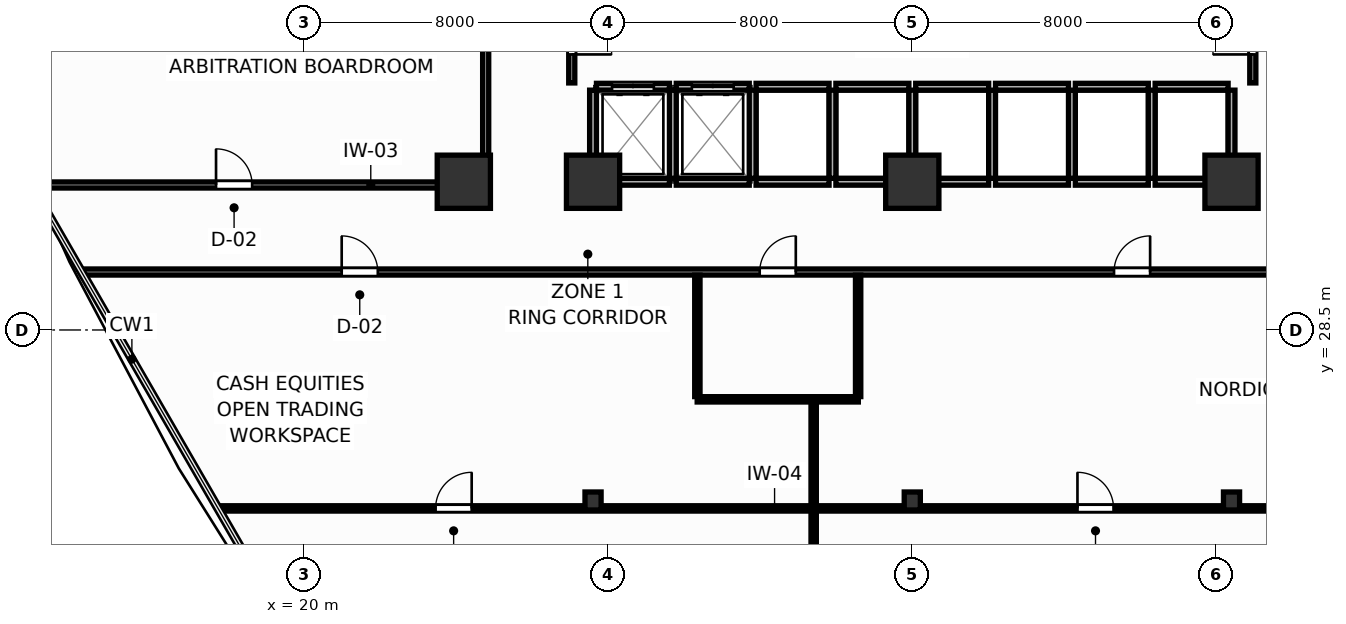
"""IFC4 building model, lengths in metres.
Left out: names, types, materials, properties, quantities, classifications, styles, units other than length and angle.
Written with IfcOpenShell. Run it as: python <this file> out.ifc"""

import sys

from ifc_helpers import new_model, si_unit, direction, frame, frame_2d, origin, origin_2d, place, context, subcontext, project, spatial, rectangle, i_section, extrude, source, transform, mapped, element, fill, save


model = new_model("IFC4")
c1 = context("Model", 3, precision=1e-05, world=origin(), true_north=direction((0.0, 1.0)))
c2 = subcontext(c1, "Body", "Model", "MODEL_VIEW")
j1 = project(units=[si_unit("LENGTHUNIT", "METRE"), si_unit("PLANEANGLEUNIT", "RADIAN")], contexts=[c1])
p1 = place(None, origin())
s1 = spatial("IfcSite", under=j1, at=p1, CompositionType="ELEMENT")
p2 = place(p1, origin())
s2 = spatial("IfcBuilding", under=s1, at=p2, CompositionType="ELEMENT")
p3 = place(p2, frame((0.0, 0.0, 27.9)))
s3 = spatial("IfcBuildingStorey", under=s2, at=p3, CompositionType="ELEMENT", Elevation=27.9)
m1 = source(origin(), c2, "Body", "SweptSolid", [
    extrude(rectangle(XDim=1.4, YDim=1.4, at=origin_2d()), origin(), (0.0, 0.0, 1.0), 3.9),
])
for number, where, z_axis, x_axis in (
    (1, (27.6, 32.4, 0.0), (0.0, 0.0, 1.0), (1.0, 0.0, 0.0)),
    (2, (44.4, 32.4, 0.0), (0.0, 0.0, 1.0), (1.0, 0.0, 0.0)),
    (3, (36.0, 32.4, 0.0), (0.0, 0.0, 1.0), (1.0, 0.0, 0.0)),
    (4, (24.2, 32.4, 0.0), (0.0, 0.0, 1.0), (1.0, 0.0, 0.0)),
):
    element("IfcColumn", number, at=place(p3, frame(where, z_axis=z_axis, x_axis=x_axis)), inside=s3, PredefinedType="COLUMN", context=c2, shape_type="MappedRepresentation", body=[
        mapped(m1, transform((0.0, 0.0, 0.0), scale=1.0)),
    ])
m2 = source(origin(), c2, "Body", "SweptSolid", [
    extrude(i_section(OverallWidth=0.424, OverallDepth=0.474, WebThickness=0.045, FlangeThickness=0.072, FilletRadius=0.015, at=origin_2d()), origin(), (0.0, 0.0, 1.0), 3.9),
])
for number, where, z_axis, x_axis in (
    (5, (27.6, 24.0, 0.0), (0.0, 0.0, 1.0), (1.0, 0.0, 0.0)),
    (6, (44.4, 24.0, 0.0), (0.0, 0.0, 1.0), (1.0, 0.0, 0.0)),
    (7, (36.0, 24.0, 0.0), (0.0, 0.0, 1.0), (1.0, 0.0, 0.0)),
):
    element("IfcColumn", number, at=place(p3, frame(where, z_axis=z_axis, x_axis=x_axis)), inside=s3, PredefinedType="COLUMN", context=c2, shape_type="MappedRepresentation", body=[
        mapped(m2, transform((0.0, 0.0, 0.0), scale=1.0)),
    ])
p4 = place(p3, frame((27.69, 34.9, 0.0), z_axis=(0.0, 0.0, 1.0), x_axis=(1.0, 0.0, 0.0)))
e8 = element("IfcWall", 8, at=p4, inside=s3, PredefinedType="PARTITIONING", context=c2, shape_type="SweptSolid", body=[
    extrude(rectangle(XDim=1.92, YDim=0.18, at=frame_2d((0.96, 0.0))), origin(), (0.0, 0.0, 1.0), 3.68),
])
p5 = place(p4, frame((0.41, 0.0, 0.0)))
e9 = element("IfcOpeningElement", 9, at=p5, cuts=e8, PredefinedType="OPENING", context=c2, shape_type="SweptSolid", body=[
    extrude(rectangle(XDim=1.1, YDim=2.1, at=frame_2d((0.55, 1.05))), frame((0.0, 0.1, 0.0), z_axis=(0.0, -1.0, 0.0), x_axis=(1.0, 0.0, 0.0)), (0.0, 0.0, 1.0), 0.2),
])
p6 = place(p3, frame((27.69, 32.4, 0.0), z_axis=(0.0, 0.0, 1.0), x_axis=(1.0, 0.0, 0.0)))
e10 = element("IfcWall", 10, at=p6, inside=s3, PredefinedType="PARTITIONING", context=c2, shape_type="SweptSolid", body=[
    extrude(rectangle(XDim=1.92, YDim=0.18, at=frame_2d((0.96, 0.0))), origin(), (0.0, 0.0, 1.0), 3.18),
])
p7 = place(p3, frame((27.6, 32.49, 0.0), z_axis=(0.0, 0.0, 1.0), x_axis=(0.0, 1.0, 0.0)))
e11 = element("IfcWall", 11, at=p7, inside=s3, PredefinedType="PARTITIONING", context=c2, shape_type="SweptSolid", body=[
    extrude(rectangle(XDim=2.32, YDim=0.18, at=frame_2d((1.16, 0.0))), origin(), (0.0, 0.0, 1.0), 3.68),
])
p8 = place(p3, frame((29.79, 34.9, 0.0), z_axis=(0.0, 0.0, 1.0), x_axis=(1.0, 0.0, 0.0)))
e12 = element("IfcWall", 12, at=p8, inside=s3, PredefinedType="PARTITIONING", context=c2, shape_type="SweptSolid", body=[
    extrude(rectangle(XDim=1.92, YDim=0.18, at=frame_2d((0.96, 0.0))), origin(), (0.0, 0.0, 1.0), 3.68),
])
p9 = place(p8, frame((0.41, 0.0, 0.0)))
e13 = element("IfcOpeningElement", 13, at=p9, cuts=e12, PredefinedType="OPENING", context=c2, shape_type="SweptSolid", body=[
    extrude(rectangle(XDim=1.1, YDim=2.1, at=frame_2d((0.55, 1.05))), frame((0.0, 0.1, 0.0), z_axis=(0.0, -1.0, 0.0), x_axis=(1.0, 0.0, 0.0)), (0.0, 0.0, 1.0), 0.2),
])
p10 = place(p3, frame((29.79, 32.4, 0.0), z_axis=(0.0, 0.0, 1.0), x_axis=(1.0, 0.0, 0.0)))
e14 = element("IfcWall", 14, at=p10, inside=s3, PredefinedType="PARTITIONING", context=c2, shape_type="SweptSolid", body=[
    extrude(rectangle(XDim=1.92, YDim=0.18, at=frame_2d((0.96, 0.0))), origin(), (0.0, 0.0, 1.0), 3.18),
])
p11 = place(p3, frame((29.7, 32.49, 0.0), z_axis=(0.0, 0.0, 1.0), x_axis=(0.0, 1.0, 0.0)))
e15 = element("IfcWall", 15, at=p11, inside=s3, PredefinedType="PARTITIONING", context=c2, shape_type="SweptSolid", body=[
    extrude(rectangle(XDim=2.32, YDim=0.18, at=frame_2d((1.16, 0.0))), origin(), (0.0, 0.0, 1.0), 3.68),
])
p12 = place(p3, frame((31.89, 34.9, 0.0), z_axis=(0.0, 0.0, 1.0), x_axis=(1.0, 0.0, 0.0)))
e16 = element("IfcWall", 16, at=p12, inside=s3, PredefinedType="PARTITIONING", context=c2, shape_type="SweptSolid", body=[
    extrude(rectangle(XDim=1.92, YDim=0.18, at=frame_2d((0.96, 0.0))), origin(), (0.0, 0.0, 1.0), 3.68),
])
p13 = place(p3, frame((31.89, 32.4, 0.0), z_axis=(0.0, 0.0, 1.0), x_axis=(1.0, 0.0, 0.0)))
e17 = element("IfcWall", 17, at=p13, inside=s3, PredefinedType="PARTITIONING", context=c2, shape_type="SweptSolid", body=[
    extrude(rectangle(XDim=1.92, YDim=0.18, at=frame_2d((0.96, 0.0))), origin(), (0.0, 0.0, 1.0), 3.18),
])
p14 = place(p3, frame((31.8, 32.49, 0.0), z_axis=(0.0, 0.0, 1.0), x_axis=(0.0, 1.0, 0.0)))
e18 = element("IfcWall", 18, at=p14, inside=s3, PredefinedType="PARTITIONING", context=c2, shape_type="SweptSolid", body=[
    extrude(rectangle(XDim=2.32, YDim=0.18, at=frame_2d((1.16, 0.0))), origin(), (0.0, 0.0, 1.0), 3.68),
])
p15 = place(p3, frame((33.99, 34.9, 0.0), z_axis=(0.0, 0.0, 1.0), x_axis=(1.0, 0.0, 0.0)))
e19 = element("IfcWall", 19, at=p15, inside=s3, PredefinedType="PARTITIONING", context=c2, shape_type="SweptSolid", body=[
    extrude(rectangle(XDim=1.92, YDim=0.18, at=frame_2d((0.96, 0.0))), origin(), (0.0, 0.0, 1.0), 3.68),
])
p16 = place(p3, frame((33.99, 32.4, 0.0), z_axis=(0.0, 0.0, 1.0), x_axis=(1.0, 0.0, 0.0)))
e20 = element("IfcWall", 20, at=p16, inside=s3, PredefinedType="PARTITIONING", context=c2, shape_type="SweptSolid", body=[
    extrude(rectangle(XDim=1.92, YDim=0.18, at=frame_2d((0.96, 0.0))), origin(), (0.0, 0.0, 1.0), 3.18),
])
p17 = place(p3, frame((33.9, 32.49, 0.0), z_axis=(0.0, 0.0, 1.0), x_axis=(0.0, 1.0, 0.0)))
e21 = element("IfcWall", 21, at=p17, inside=s3, PredefinedType="PARTITIONING", context=c2, shape_type="SweptSolid", body=[
    extrude(rectangle(XDim=2.32, YDim=0.18, at=frame_2d((1.16, 0.0))), origin(), (0.0, 0.0, 1.0), 3.68),
])
p18 = place(p3, frame((36.09, 34.9, 0.0), z_axis=(0.0, 0.0, 1.0), x_axis=(1.0, 0.0, 0.0)))
e22 = element("IfcWall", 22, at=p18, inside=s3, PredefinedType="PARTITIONING", context=c2, shape_type="SweptSolid", body=[
    extrude(rectangle(XDim=1.92, YDim=0.18, at=frame_2d((0.96, 0.0))), origin(), (0.0, 0.0, 1.0), 3.68),
])
p19 = place(p3, frame((36.09, 32.4, 0.0), z_axis=(0.0, 0.0, 1.0), x_axis=(1.0, 0.0, 0.0)))
e23 = element("IfcWall", 23, at=p19, inside=s3, PredefinedType="PARTITIONING", context=c2, shape_type="SweptSolid", body=[
    extrude(rectangle(XDim=1.92, YDim=0.18, at=frame_2d((0.96, 0.0))), origin(), (0.0, 0.0, 1.0), 3.18),
])
p20 = place(p3, frame((36.0, 32.49, 0.0), z_axis=(0.0, 0.0, 1.0), x_axis=(0.0, 1.0, 0.0)))
e24 = element("IfcWall", 24, at=p20, inside=s3, PredefinedType="PARTITIONING", context=c2, shape_type="SweptSolid", body=[
    extrude(rectangle(XDim=2.32, YDim=0.18, at=frame_2d((1.16, 0.0))), origin(), (0.0, 0.0, 1.0), 3.68),
])
p21 = place(p3, frame((38.19, 34.9, 0.0), z_axis=(0.0, 0.0, 1.0), x_axis=(1.0, 0.0, 0.0)))
e25 = element("IfcWall", 25, at=p21, inside=s3, PredefinedType="PARTITIONING", context=c2, shape_type="SweptSolid", body=[
    extrude(rectangle(XDim=1.92, YDim=0.18, at=frame_2d((0.96, 0.0))), origin(), (0.0, 0.0, 1.0), 3.68),
])
p22 = place(p3, frame((38.19, 32.4, 0.0), z_axis=(0.0, 0.0, 1.0), x_axis=(1.0, 0.0, 0.0)))
e26 = element("IfcWall", 26, at=p22, inside=s3, PredefinedType="PARTITIONING", context=c2, shape_type="SweptSolid", body=[
    extrude(rectangle(XDim=1.92, YDim=0.18, at=frame_2d((0.96, 0.0))), origin(), (0.0, 0.0, 1.0), 3.18),
])
p23 = place(p3, frame((38.1, 32.49, 0.0), z_axis=(0.0, 0.0, 1.0), x_axis=(0.0, 1.0, 0.0)))
e27 = element("IfcWall", 27, at=p23, inside=s3, PredefinedType="PARTITIONING", context=c2, shape_type="SweptSolid", body=[
    extrude(rectangle(XDim=2.32, YDim=0.18, at=frame_2d((1.16, 0.0))), origin(), (0.0, 0.0, 1.0), 3.68),
])
p24 = place(p3, frame((40.29, 34.9, 0.0), z_axis=(0.0, 0.0, 1.0), x_axis=(1.0, 0.0, 0.0)))
e28 = element("IfcWall", 28, at=p24, inside=s3, PredefinedType="PARTITIONING", context=c2, shape_type="SweptSolid", body=[
    extrude(rectangle(XDim=1.92, YDim=0.18, at=frame_2d((0.96, 0.0))), origin(), (0.0, 0.0, 1.0), 3.68),
])
p25 = place(p3, frame((40.29, 32.4, 0.0), z_axis=(0.0, 0.0, 1.0), x_axis=(1.0, 0.0, 0.0)))
e29 = element("IfcWall", 29, at=p25, inside=s3, PredefinedType="PARTITIONING", context=c2, shape_type="SweptSolid", body=[
    extrude(rectangle(XDim=1.92, YDim=0.18, at=frame_2d((0.96, 0.0))), origin(), (0.0, 0.0, 1.0), 3.18),
])
p26 = place(p3, frame((40.2, 32.49, 0.0), z_axis=(0.0, 0.0, 1.0), x_axis=(0.0, 1.0, 0.0)))
e30 = element("IfcWall", 30, at=p26, inside=s3, PredefinedType="PARTITIONING", context=c2, shape_type="SweptSolid", body=[
    extrude(rectangle(XDim=2.32, YDim=0.18, at=frame_2d((1.16, 0.0))), origin(), (0.0, 0.0, 1.0), 3.68),
])
p27 = place(p3, frame((42.39, 34.9, 0.0), z_axis=(0.0, 0.0, 1.0), x_axis=(1.0, 0.0, 0.0)))
e31 = element("IfcWall", 31, at=p27, inside=s3, PredefinedType="PARTITIONING", context=c2, shape_type="SweptSolid", body=[
    extrude(rectangle(XDim=1.92, YDim=0.18, at=frame_2d((0.96, 0.0))), origin(), (0.0, 0.0, 1.0), 3.68),
])
p28 = place(p3, frame((42.39, 32.4, 0.0), z_axis=(0.0, 0.0, 1.0), x_axis=(1.0, 0.0, 0.0)))
e32 = element("IfcWall", 32, at=p28, inside=s3, PredefinedType="PARTITIONING", context=c2, shape_type="SweptSolid", body=[
    extrude(rectangle(XDim=1.92, YDim=0.18, at=frame_2d((0.96, 0.0))), origin(), (0.0, 0.0, 1.0), 3.18),
])
for number, where, z_axis, x_axis in (
    (33, (42.3, 32.49, 0.0), (0.0, 0.0, 1.0), (0.0, 1.0, 0.0)),
    (34, (44.4, 32.49, 0.0), (0.0, 0.0, 1.0), (0.0, 1.0, 0.0)),
):
    element("IfcWall", number, at=place(p3, frame(where, z_axis=z_axis, x_axis=x_axis)), inside=s3, PredefinedType="PARTITIONING", context=c2, shape_type="SweptSolid", body=[
        extrude(rectangle(XDim=2.32, YDim=0.18, at=frame_2d((1.16, 0.0))), origin(), (0.0, 0.0, 1.0), 3.68),
    ])
p29 = place(p3, frame((27.04, 35.0, 0.0), z_axis=(0.0, 0.0, 1.0), x_axis=(0.0, 1.0, 0.0)))
e35 = element("IfcWall", 35, at=p29, inside=s3, PredefinedType="PARTITIONING", context=c2, shape_type="SweptSolid", body=[
    extrude(rectangle(XDim=2.65, YDim=0.16, at=frame_2d((1.325, 0.0))), origin(), (0.0, 0.0, 1.0), 3.68),
])
p30 = place(p29, frame((0.75, 0.0, 0.0)))
e36 = element("IfcOpeningElement", 36, at=p30, cuts=e35, PredefinedType="OPENING", context=c2, shape_type="SweptSolid", body=[
    extrude(rectangle(XDim=1.05, YDim=2.1, at=frame_2d((0.525, 1.05))), frame((0.0, 0.09, 0.0), z_axis=(0.0, -1.0, 0.0), x_axis=(1.0, 0.0, 0.0)), (0.0, 0.0, 1.0), 0.18),
])
p31 = place(p3, frame((44.96, 35.0, 0.0), z_axis=(0.0, 0.0, 1.0), x_axis=(0.0, 1.0, 0.0)))
e37 = element("IfcWall", 37, at=p31, inside=s3, PredefinedType="PARTITIONING", context=c2, shape_type="SweptSolid", body=[
    extrude(rectangle(XDim=2.65, YDim=0.16, at=frame_2d((1.325, 0.0))), origin(), (0.0, 0.0, 1.0), 3.68),
])
p32 = place(p31, frame((0.75, 0.0, 0.0)))
e38 = element("IfcOpeningElement", 38, at=p32, cuts=e37, PredefinedType="OPENING", context=c2, shape_type="SweptSolid", body=[
    extrude(rectangle(XDim=1.05, YDim=2.1, at=frame_2d((0.525, 1.05))), frame((0.0, 0.09, 0.0), z_axis=(0.0, -1.0, 0.0), x_axis=(1.0, 0.0, 0.0)), (0.0, 0.0, 1.0), 0.18),
])
p33 = place(p3, frame((14.162, 30.025, 0.0), z_axis=(0.0, 0.0, 1.0), x_axis=(1.0, 0.0, 0.0)))
e39 = element("IfcWall", 39, at=p33, inside=s3, PredefinedType="PARTITIONING", context=c2, shape_type="SweptSolid", body=[
    extrude(rectangle(XDim=43.676, YDim=0.16, at=frame_2d((21.838, 0.0))), origin(), (0.0, 0.0, 1.0), 3.68),
])
p34 = place(p33, frame((17.823, 0.0, 0.0)))
e40 = element("IfcOpeningElement", 40, at=p34, cuts=e39, PredefinedType="OPENING", context=c2, shape_type="SweptSolid", body=[
    extrude(rectangle(XDim=0.95, YDim=2.05, at=frame_2d((0.475, 1.025))), frame((0.0, 0.09, 0.0), z_axis=(0.0, -1.0, 0.0), x_axis=(1.0, 0.0, 0.0)), (0.0, 0.0, 1.0), 0.18),
])
p35 = place(p33, frame((6.824, 0.0, 0.0)))
e41 = element("IfcOpeningElement", 41, at=p35, cuts=e39, PredefinedType="OPENING", context=c2, shape_type="SweptSolid", body=[
    extrude(rectangle(XDim=0.95, YDim=2.05, at=frame_2d((0.475, 1.025))), frame((0.0, 0.09, 0.0), z_axis=(0.0, -1.0, 0.0), x_axis=(1.0, 0.0, 0.0)), (0.0, 0.0, 1.0), 0.18),
])
p36 = place(p33, frame((27.146, 0.0, 0.0)))
e42 = element("IfcOpeningElement", 42, at=p36, cuts=e39, PredefinedType="OPENING", context=c2, shape_type="SweptSolid", body=[
    extrude(rectangle(XDim=0.95, YDim=2.05, at=frame_2d((0.475, 1.025))), frame((0.0, 0.09, 0.0), z_axis=(0.0, -1.0, 0.0), x_axis=(1.0, 0.0, 0.0)), (0.0, 0.0, 1.0), 0.18),
])
p37 = place(p3, frame((24.775, 32.31, 0.0), z_axis=(0.0, 0.0, 1.0), x_axis=(0.0, 1.0, 0.0)))
e43 = element("IfcWall", 43, at=p37, inside=s3, PredefinedType="PARTITIONING", context=c2, shape_type="SweptSolid", body=[
    extrude(rectangle(XDim=25.059, YDim=0.16, at=frame_2d((12.529, 0.0))), origin(), (0.0, 0.0, 1.0), 3.68),
])
p38 = place(p37, frame((17.287, 0.0, 0.0)))
e44 = element("IfcOpeningElement", 44, at=p38, cuts=e43, PredefinedType="OPENING", context=c2, shape_type="SweptSolid", body=[
    extrude(rectangle(XDim=0.95, YDim=2.05, at=frame_2d((0.475, 1.025))), frame((0.0, 0.09, 0.0), z_axis=(0.0, -1.0, 0.0), x_axis=(1.0, 0.0, 0.0)), (0.0, 0.0, 1.0), 0.18),
])
p39 = place(p3, frame((12.893, 32.315, 0.0), z_axis=(0.0, 0.0, 1.0), x_axis=(1.0, 0.0, 0.0)))
e45 = element("IfcWall", 45, at=p39, inside=s3, PredefinedType="PARTITIONING", context=c2, shape_type="SweptSolid", body=[
    extrude(rectangle(XDim=11.8, YDim=0.16, at=frame_2d((5.9, 0.0))), origin(), (0.0, 0.0, 1.0), 3.18),
])
p40 = place(p39, frame((4.787, 0.0, 0.0)))
e46 = element("IfcOpeningElement", 46, at=p40, cuts=e45, PredefinedType="OPENING", context=c2, shape_type="SweptSolid", body=[
    extrude(rectangle(XDim=0.95, YDim=2.05, at=frame_2d((0.475, 1.025))), frame((0.0, 0.09, 0.0), z_axis=(0.0, -1.0, 0.0), x_axis=(1.0, 0.0, 0.0)), (0.0, 0.0, 1.0), 0.18),
])
p41 = place(p3, frame((17.753, 23.805, 0.0), z_axis=(0.0, 0.0, 1.0), x_axis=(1.0, 0.0, 0.0)))
e47 = element("IfcWall", 47, at=p41, inside=s3, PredefinedType="PARTITIONING", context=c2, shape_type="SweptSolid", body=[
    extrude(rectangle(XDim=36.494, YDim=0.14, at=frame_2d((18.247, 0.0))), origin(), (0.0, 0.0, 1.0), 3.18),
])
p42 = place(p41, frame((5.704, 0.0, 0.0)))
e48 = element("IfcOpeningElement", 48, at=p42, cuts=e47, PredefinedType="OPENING", context=c2, shape_type="SweptSolid", body=[
    extrude(rectangle(XDim=0.95, YDim=2.05, at=frame_2d((0.475, 1.025))), frame((0.0, 0.08, 0.0), z_axis=(0.0, -1.0, 0.0), x_axis=(1.0, 0.0, 0.0)), (0.0, 0.0, 1.0), 0.16),
])
p43 = place(p41, frame((22.593, 0.0, 0.0)))
e49 = element("IfcOpeningElement", 49, at=p43, cuts=e47, PredefinedType="OPENING", context=c2, shape_type="SweptSolid", body=[
    extrude(rectangle(XDim=0.95, YDim=2.05, at=frame_2d((0.475, 1.025))), frame((0.0, 0.08, 0.0), z_axis=(0.0, -1.0, 0.0), x_axis=(1.0, 0.0, 0.0)), (0.0, 0.0, 1.0), 0.16),
])
p44 = place(p3, frame((33.405, 3.129, 0.0), z_axis=(0.0, 0.0, 1.0), x_axis=(0.0, 1.0, 0.0)))
e50 = element("IfcWall", 50, at=p44, inside=s3, PredefinedType="PARTITIONING", context=c2, shape_type="SweptSolid", body=[
    extrude(rectangle(XDim=23.561, YDim=0.14, at=frame_2d((11.78, 0.0))), origin(), (0.0, 0.0, 1.0), 3.18),
])
p45 = place(p3, frame((30.34, 26.675, 0.0), z_axis=(0.0, 0.0, 1.0), x_axis=(1.0, 0.0, 0.0)))
e51 = element("IfcWall", 51, at=p45, inside=s3, PredefinedType="PARTITIONING", context=c2, shape_type="SweptSolid", body=[
    extrude(rectangle(XDim=4.24, YDim=0.14, at=frame_2d((2.12, 0.0))), origin(), (0.0, 0.0, 1.0), 3.68),
])
for number, where, z_axis, x_axis in (
    (52, (30.345, 26.747, 0.0), (0.0, 0.0, 1.0), (0.0, 1.0, 0.0)),
    (53, (34.575, 26.747, 0.0), (0.0, 0.0, 1.0), (0.0, 1.0, 0.0)),
):
    element("IfcWall", number, at=place(p3, frame(where, z_axis=z_axis, x_axis=x_axis)), inside=s3, PredefinedType="PARTITIONING", context=c2, shape_type="SweptSolid", body=[
        extrude(rectangle(XDim=3.196, YDim=0.14, at=frame_2d((1.598, 0.0))), origin(), (0.0, 0.0, 1.0), 3.68),
    ])
p46 = place(p5, origin())
e54 = element("IfcDoor", 54, at=p46, inside=s3, OperationType="DOUBLE_DOOR_SLIDING", PredefinedType="DOOR", context=c2, shape_type="SweptSolid", body=[
    extrude(rectangle(XDim=1.1, YDim=2.1, at=frame_2d((0.55, 1.05))), frame((0.0, 0.025, 0.0), z_axis=(0.0, -1.0, 0.0), x_axis=(1.0, 0.0, 0.0)), (0.0, 0.0, 1.0), 0.05),
])
fill(e9, e54)
p47 = place(p9, origin())
e55 = element("IfcDoor", 55, at=p47, inside=s3, OperationType="DOUBLE_DOOR_SLIDING", PredefinedType="DOOR", context=c2, shape_type="SweptSolid", body=[
    extrude(rectangle(XDim=1.1, YDim=2.1, at=frame_2d((0.55, 1.05))), frame((0.0, 0.025, 0.0), z_axis=(0.0, -1.0, 0.0), x_axis=(1.0, 0.0, 0.0)), (0.0, 0.0, 1.0), 0.05),
])
fill(e13, e55)
p48 = place(p30, frame((1.05, 0.0, 0.0), z_axis=(0.0, 0.0, 1.0), x_axis=(-1.0, 0.0, 0.0)))
e56 = element("IfcDoor", 56, at=p48, inside=s3, OperationType="SINGLE_SWING_RIGHT", PredefinedType="DOOR", context=c2, shape_type="SweptSolid", body=[
    extrude(rectangle(XDim=1.05, YDim=2.1, at=frame_2d((0.525, 1.05))), frame((0.0, 0.025, 0.0), z_axis=(0.0, -1.0, 0.0), x_axis=(1.0, 0.0, 0.0)), (0.0, 0.0, 1.0), 0.05),
])
fill(e36, e56)
p49 = place(p32, origin())
e57 = element("IfcDoor", 57, at=p49, inside=s3, OperationType="SINGLE_SWING_LEFT", PredefinedType="DOOR", context=c2, shape_type="SweptSolid", body=[
    extrude(rectangle(XDim=1.05, YDim=2.1, at=frame_2d((0.525, 1.05))), frame((0.0, 0.025, 0.0), z_axis=(0.0, -1.0, 0.0), x_axis=(1.0, 0.0, 0.0)), (0.0, 0.0, 1.0), 0.05),
])
fill(e38, e57)
p50 = place(p34, origin())
e58 = element("IfcDoor", 58, at=p50, inside=s3, OperationType="SINGLE_SWING_RIGHT", PredefinedType="DOOR", context=c2, shape_type="SweptSolid", body=[
    extrude(rectangle(XDim=0.95, YDim=2.05, at=frame_2d((0.475, 1.025))), frame((0.0, 0.025, 0.0), z_axis=(0.0, -1.0, 0.0), x_axis=(1.0, 0.0, 0.0)), (0.0, 0.0, 1.0), 0.05),
])
fill(e40, e58)
p51 = place(p35, origin())
e59 = element("IfcDoor", 59, at=p51, inside=s3, OperationType="SINGLE_SWING_LEFT", PredefinedType="DOOR", context=c2, shape_type="SweptSolid", body=[
    extrude(rectangle(XDim=0.95, YDim=2.05, at=frame_2d((0.475, 1.025))), frame((0.0, 0.025, 0.0), z_axis=(0.0, -1.0, 0.0), x_axis=(1.0, 0.0, 0.0)), (0.0, 0.0, 1.0), 0.05),
])
fill(e41, e59)
p52 = place(p36, origin())
e60 = element("IfcDoor", 60, at=p52, inside=s3, OperationType="SINGLE_SWING_RIGHT", PredefinedType="DOOR", context=c2, shape_type="SweptSolid", body=[
    extrude(rectangle(XDim=0.95, YDim=2.05, at=frame_2d((0.475, 1.025))), frame((0.0, 0.025, 0.0), z_axis=(0.0, -1.0, 0.0), x_axis=(1.0, 0.0, 0.0)), (0.0, 0.0, 1.0), 0.05),
])
fill(e42, e60)
p53 = place(p40, origin())
e61 = element("IfcDoor", 61, at=p53, inside=s3, OperationType="SINGLE_SWING_LEFT", PredefinedType="DOOR", context=c2, shape_type="SweptSolid", body=[
    extrude(rectangle(XDim=0.95, YDim=2.05, at=frame_2d((0.475, 1.025))), frame((0.0, 0.025, 0.0), z_axis=(0.0, -1.0, 0.0), x_axis=(1.0, 0.0, 0.0)), (0.0, 0.0, 1.0), 0.05),
])
fill(e46, e61)
p54 = place(p42, origin())
e62 = element("IfcDoor", 62, at=p54, inside=s3, OperationType="SINGLE_SWING_RIGHT", PredefinedType="DOOR", context=c2, shape_type="SweptSolid", body=[
    extrude(rectangle(XDim=0.95, YDim=2.05, at=frame_2d((0.475, 1.025))), frame((0.0, 0.025, 0.0), z_axis=(0.0, -1.0, 0.0), x_axis=(1.0, 0.0, 0.0)), (0.0, 0.0, 1.0), 0.05),
])
fill(e48, e62)
p55 = place(p43, origin())
e63 = element("IfcDoor", 63, at=p55, inside=s3, OperationType="SINGLE_SWING_LEFT", PredefinedType="DOOR", context=c2, shape_type="SweptSolid", body=[
    extrude(rectangle(XDim=0.95, YDim=2.05, at=frame_2d((0.475, 1.025))), frame((0.0, 0.025, 0.0), z_axis=(0.0, -1.0, 0.0), x_axis=(1.0, 0.0, 0.0)), (0.0, 0.0, 1.0), 0.05),
])
fill(e49, e63)
save(model, sys.argv[1])
